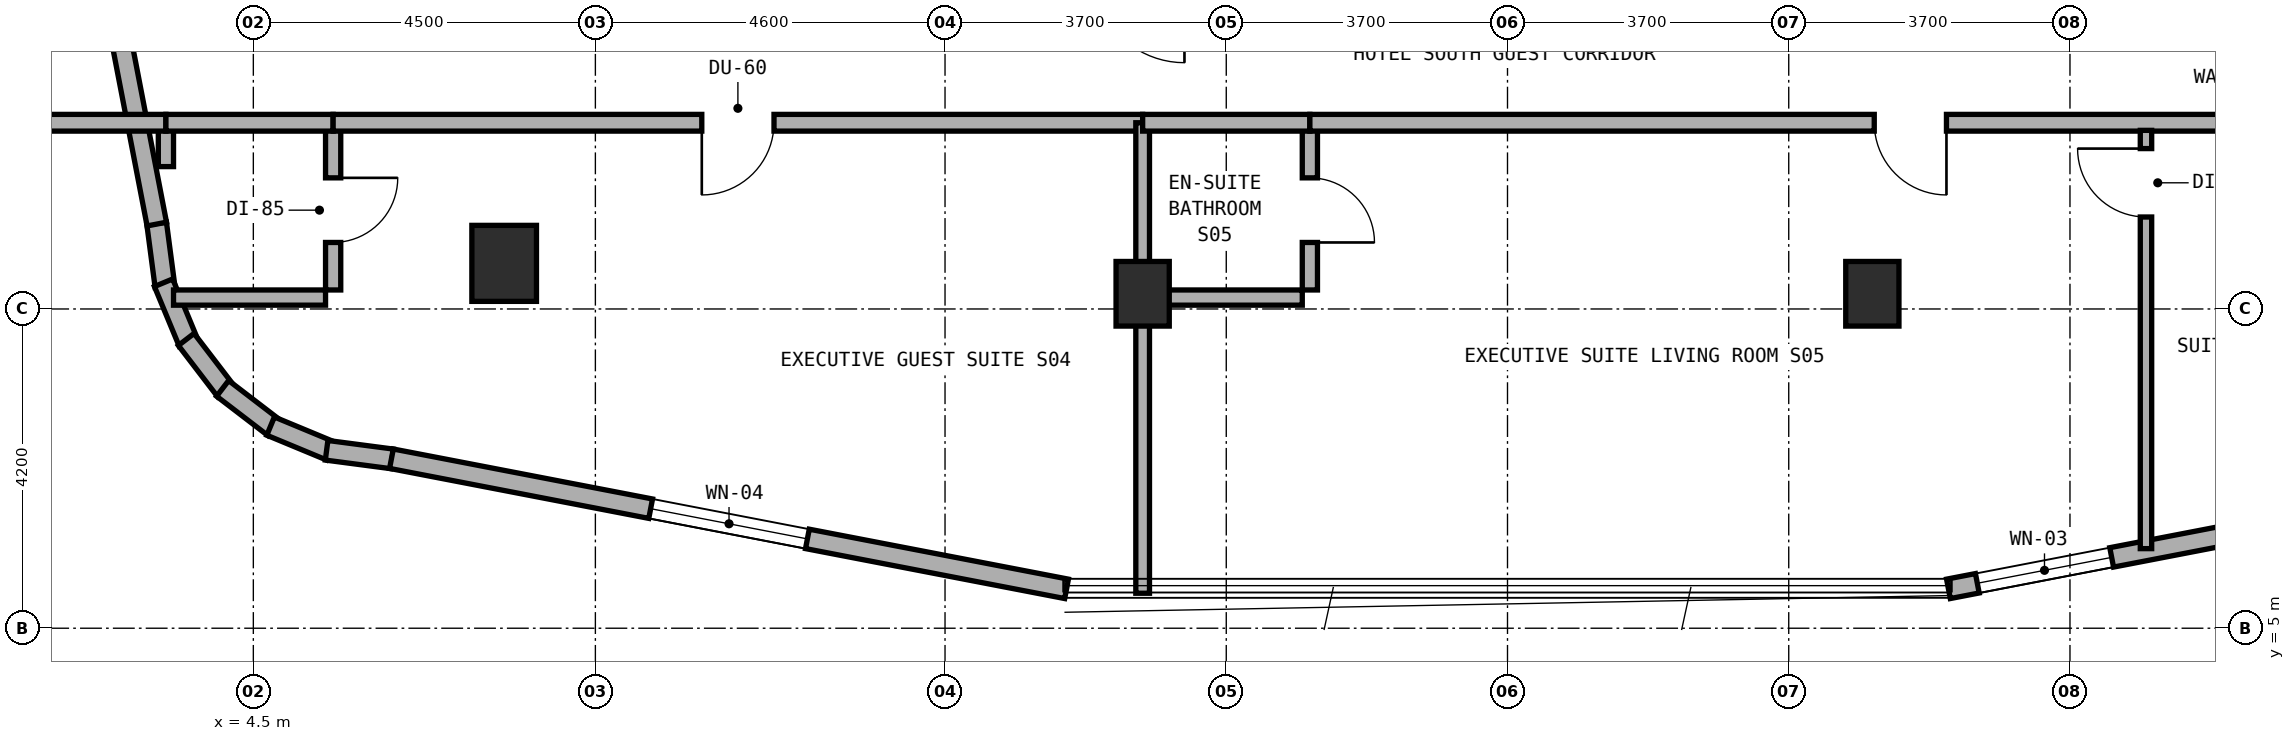
"""IFC4 building model, lengths in metres.
Left out: names, types, materials, properties, quantities, classifications, styles, units other than length and angle.
Written with IfcOpenShell. Run it as: python <this file> out.ifc"""

import sys

from ifc_helpers import new_model, si_unit, direction, frame, frame_2d, origin, origin_2d, place, context, subcontext, project, spatial, rectangle, extrude, element, fill, save


model = new_model("IFC4")
c1 = context("Model", 3, precision=1e-05, world=origin(), true_north=direction((0.0, 1.0)))
c2 = subcontext(c1, "Body", "Model", "MODEL_VIEW")
j1 = project(units=[si_unit("LENGTHUNIT", "METRE"), si_unit("PLANEANGLEUNIT", "RADIAN")], contexts=[c1])
p1 = place(None, origin())
s1 = spatial("IfcSite", under=j1, at=p1, CompositionType="ELEMENT")
p2 = place(p1, origin())
s2 = spatial("IfcBuilding", under=s1, at=p2, CompositionType="ELEMENT")
p3 = place(p2, frame((0.0, 0.0, 195.5)))
s3 = spatial("IfcBuildingStorey", under=s2, at=p3, CompositionType="ELEMENT", Elevation=195.5)
for number, where, z_axis, x_axis in (
    (1, (16.2, 9.4, 0.0), (0.0, 0.0, 1.0), (1.0, 0.0, 0.0)),
    (2, (25.8, 9.4, 0.0), (0.0, 0.0, 1.0), (1.0, 0.0, 0.0)),
):
    element("IfcColumn", number, at=place(p3, frame(where, z_axis=z_axis, x_axis=x_axis)), inside=s3, PredefinedType="COLUMN", context=c2, shape_type="SweptSolid", body=[
        extrude(rectangle(XDim=0.7, YDim=0.85, at=origin_2d()), origin(), (0.0, 0.0, 1.0), 3.6),
    ])
p4 = place(p3, frame((7.8, 9.8, 0.0), z_axis=(0.0, 0.0, 1.0), x_axis=(1.0, 0.0, 0.0)))
e3 = element("IfcColumn", 3, at=p4, inside=s3, PredefinedType="COLUMN", context=c2, shape_type="SweptSolid", body=[
    extrude(rectangle(XDim=0.85, YDim=1.0, at=origin_2d()), origin(), (0.0, 0.0, 1.0), 3.6),
])
p5 = place(p3, frame((3.228, 10.325, 0.0), z_axis=(0.0, 0.0, 1.0), x_axis=(0.130704676564, -0.99142134712, 0.0)))
e4 = element("IfcWall", 4, at=p5, inside=s3, PredefinedType="STANDARD", context=c2, shape_type="SweptSolid", body=[
    extrude(rectangle(XDim=0.833, YDim=0.26, at=frame_2d((0.417, 0.0))), origin(), (0.0, 0.0, 1.0), 3.28),
])
p6 = place(p3, frame((3.319, 9.545, 0.0), z_axis=(0.0, 0.0, 1.0), x_axis=(0.383086687796, -0.923712395518, 0.0)))
e5 = element("IfcWall", 5, at=p6, inside=s3, PredefinedType="STANDARD", context=c2, shape_type="SweptSolid", body=[
    extrude(rectangle(XDim=0.851, YDim=0.26, at=frame_2d((0.425, 0.0))), origin(), (0.0, 0.0, 1.0), 3.28),
])
for number, where, z_axis, x_axis in (
    (6, (3.617, 8.799, 0.0), (0.0, 0.0, 1.0), (0.608, -0.794, 0.0)),
    (7, (4.096, 8.155, 0.0), (0.0, 0.0, 1.0), (0.794, -0.608, 0.0)),
):
    element("IfcWall", number, at=place(p3, frame(where, z_axis=z_axis, x_axis=x_axis)), inside=s3, PredefinedType="STANDARD", context=c2, shape_type="SweptSolid", body=[
        extrude(rectangle(XDim=0.85, YDim=0.26, at=frame_2d((0.425, 0.0))), origin(), (0.0, 0.0, 1.0), 3.28),
    ])
p7 = place(p3, frame((4.727, 7.659, 0.0), z_axis=(0.0, 0.0, 1.0), x_axis=(0.923712395518, -0.383086687796, 0.0)))
e8 = element("IfcWall", 8, at=p7, inside=s3, PredefinedType="STANDARD", context=c2, shape_type="SweptSolid", body=[
    extrude(rectangle(XDim=0.851, YDim=0.26, at=frame_2d((0.425, 0.0))), origin(), (0.0, 0.0, 1.0), 3.28),
])
p8 = place(p3, frame((5.464, 7.341, 0.0), z_axis=(0.0, 0.0, 1.0), x_axis=(0.991488716273, -0.130192647656, 0.0)))
e9 = element("IfcWall", 9, at=p8, inside=s3, PredefinedType="STANDARD", context=c2, shape_type="SweptSolid", body=[
    extrude(rectangle(XDim=0.868, YDim=0.26, at=frame_2d((0.434, 0.0))), origin(), (0.0, 0.0, 1.0), 3.28),
])
p9 = place(p3, frame((6.317, 7.23, 0.0), z_axis=(0.0, 0.0, 1.0), x_axis=(0.98192801022, -0.189254809039, 0.0)))
e10 = element("IfcWall", 10, at=p9, inside=s3, PredefinedType="STANDARD", context=c2, shape_type="SweptSolid", body=[
    extrude(rectangle(XDim=9.046, YDim=0.26, at=frame_2d((4.523, 0.0))), origin(), (0.0, 0.0, 1.0), 3.28),
])
p10 = place(p9, frame((3.473, 0.0, 0.85)))
e11 = element("IfcOpeningElement", 11, at=p10, cuts=e10, PredefinedType="OPENING", context=c2, shape_type="SweptSolid", body=[
    extrude(rectangle(XDim=2.1, YDim=1.5, at=frame_2d((1.05, 0.75))), frame((0.0, 0.14, 0.0), z_axis=(0.0, -1.0, 0.0), x_axis=(1.0, 0.0, 0.0)), (0.0, 0.0, 1.0), 0.28),
])
p11 = place(p3, frame((26.801, 5.518, 0.0), z_axis=(0.0, 0.0, 1.0), x_axis=(0.98192801022, 0.189254809039, 0.0)))
e12 = element("IfcWall", 12, at=p11, inside=s3, PredefinedType="STANDARD", context=c2, shape_type="SweptSolid", body=[
    extrude(rectangle(XDim=9.046, YDim=0.26, at=frame_2d((4.523, 0.0))), origin(), (0.0, 0.0, 1.0), 3.28),
])
p12 = place(p11, frame((0.387, 0.0, 0.85)))
e13 = element("IfcOpeningElement", 13, at=p12, cuts=e12, PredefinedType="OPENING", context=c2, shape_type="SweptSolid", body=[
    extrude(rectangle(XDim=1.8, YDim=1.5, at=frame_2d((0.9, 0.75))), frame((0.0, 0.14, 0.0), z_axis=(0.0, -1.0, 0.0), x_axis=(1.0, 0.0, 0.0)), (0.0, 0.0, 1.0), 0.28),
])
p13 = place(p11, frame((4.065, 0.0, 0.85)))
e14 = element("IfcOpeningElement", 14, at=p13, cuts=e12, PredefinedType="OPENING", context=c2, shape_type="SweptSolid", body=[
    extrude(rectangle(XDim=2.1, YDim=1.5, at=frame_2d((1.05, 0.75))), frame((0.0, 0.14, 0.0), z_axis=(0.0, -1.0, 0.0), x_axis=(1.0, 0.0, 0.0)), (0.0, 0.0, 1.0), 0.28),
])
p14 = place(p3, frame((1.518, 19.199, 0.0), z_axis=(0.0, 0.0, 1.0), x_axis=(0.189254809039, -0.98192801022, 0.0)))
e15 = element("IfcWall", 15, at=p14, inside=s3, PredefinedType="STANDARD", context=c2, shape_type="SweptSolid", body=[
    extrude(rectangle(XDim=9.046, YDim=0.26, at=frame_2d((4.523, 0.0))), origin(), (0.0, 0.0, 1.0), 3.28),
])
p15 = place(p14, frame((2.733, 0.0, 0.85)))
e16 = element("IfcOpeningElement", 16, at=p15, cuts=e15, PredefinedType="OPENING", context=c2, shape_type="SweptSolid", body=[
    extrude(rectangle(XDim=2.1, YDim=1.5, at=frame_2d((1.05, 0.75))), frame((0.0, 0.14, 0.0), z_axis=(0.0, -1.0, 0.0), x_axis=(1.0, 0.0, 0.0)), (0.0, 0.0, 1.0), 0.28),
])
p16 = place(p3, frame((5.55, 9.45, 0.0), z_axis=(0.0, 0.0, 1.0), x_axis=(0.0, 1.0, 0.0)))
e17 = element("IfcWall", 17, at=p16, inside=s3, PredefinedType="PLUMBINGWALL", context=c2, shape_type="SweptSolid", body=[
    extrude(rectangle(XDim=2.1, YDim=0.2, at=frame_2d((1.05, 0.0))), origin(), (0.0, 0.0, 1.0), 3.28),
])
p17 = place(p16, frame((0.625, 0.0, 0.0)))
e18 = element("IfcOpeningElement", 18, at=p17, cuts=e17, PredefinedType="OPENING", context=c2, shape_type="SweptSolid", body=[
    extrude(rectangle(XDim=0.85, YDim=2.1, at=frame_2d((0.425, 1.05))), frame((0.0, 0.11, 0.0), z_axis=(0.0, -1.0, 0.0), x_axis=(1.0, 0.0, 0.0)), (0.0, 0.0, 1.0), 0.22),
])
p18 = place(p3, frame((3.45, 9.35, 0.0), z_axis=(0.0, 0.0, 1.0), x_axis=(1.0, 0.0, 0.0)))
e19 = element("IfcWall", 19, at=p18, inside=s3, PredefinedType="PLUMBINGWALL", context=c2, shape_type="SweptSolid", body=[
    extrude(rectangle(XDim=2.0, YDim=0.2, at=frame_2d((1.0, 0.0))), origin(), (0.0, 0.0, 1.0), 3.28),
])
p19 = place(p3, frame((3.35, 11.073, 0.0), z_axis=(0.0, 0.0, 1.0), x_axis=(0.0, 1.0, 0.0)))
e20 = element("IfcWall", 20, at=p19, inside=s3, PredefinedType="PLUMBINGWALL", context=c2, shape_type="SweptSolid", body=[
    extrude(rectangle(XDim=0.577, YDim=0.2, at=frame_2d((0.289, 0.0))), origin(), (0.0, 0.0, 1.0), 3.28),
])
p20 = place(p3, frame((1.56, 11.65, 0.0), z_axis=(0.0, 0.0, 1.0), x_axis=(1.0, 0.0, 0.0)))
e21 = element("IfcWall", 21, at=p20, inside=s3, PredefinedType="SOLIDWALL", context=c2, shape_type="SweptSolid", body=[
    extrude(rectangle(XDim=1.79, YDim=0.22, at=frame_2d((0.895, 0.0))), origin(), (0.0, 0.0, 1.0), 3.28),
])
p21 = place(p3, frame((3.35, 11.65, 0.0), z_axis=(0.0, 0.0, 1.0), x_axis=(1.0, 0.0, 0.0)))
e22 = element("IfcWall", 22, at=p21, inside=s3, PredefinedType="SOLIDWALL", context=c2, shape_type="SweptSolid", body=[
    extrude(rectangle(XDim=2.2, YDim=0.22, at=frame_2d((1.1, 0.0))), origin(), (0.0, 0.0, 1.0), 3.28),
])
p22 = place(p3, frame((5.55, 11.65, 0.0), z_axis=(0.0, 0.0, 1.0), x_axis=(1.0, 0.0, 0.0)))
e23 = element("IfcWall", 23, at=p22, inside=s3, PredefinedType="SOLIDWALL", context=c2, shape_type="SweptSolid", body=[
    extrude(rectangle(XDim=10.65, YDim=0.22, at=frame_2d((5.325, 0.0))), origin(), (0.0, 0.0, 1.0), 2.955),
])
p23 = place(p22, frame((4.85, 0.0, 0.0)))
e24 = element("IfcOpeningElement", 24, at=p23, cuts=e23, PredefinedType="OPENING", context=c2, shape_type="SweptSolid", body=[
    extrude(rectangle(XDim=0.95, YDim=2.1, at=frame_2d((0.475, 1.05))), frame((0.0, 0.12, 0.0), z_axis=(0.0, -1.0, 0.0), x_axis=(1.0, 0.0, 0.0)), (0.0, 0.0, 1.0), 0.24),
])
p24 = place(p3, frame((16.2, 5.46, 0.0), z_axis=(0.0, 0.0, 1.0), x_axis=(0.0, 1.0, 0.0)))
e25 = element("IfcWall", 25, at=p24, inside=s3, PredefinedType="SOLIDWALL", context=c2, shape_type="SweptSolid", body=[
    extrude(rectangle(XDim=6.19, YDim=0.18, at=frame_2d((3.095, 0.0))), origin(), (0.0, 0.0, 1.0), 2.895),
])
p25 = place(p3, frame((18.4, 9.45, 0.0), z_axis=(0.0, 0.0, 1.0), x_axis=(0.0, 1.0, 0.0)))
e26 = element("IfcWall", 26, at=p25, inside=s3, PredefinedType="PLUMBINGWALL", context=c2, shape_type="SweptSolid", body=[
    extrude(rectangle(XDim=2.1, YDim=0.2, at=frame_2d((1.05, 0.0))), origin(), (0.0, 0.0, 1.0), 2.895),
])
p26 = place(p25, frame((0.625, 0.0, 0.0)))
e27 = element("IfcOpeningElement", 27, at=p26, cuts=e26, PredefinedType="OPENING", context=c2, shape_type="SweptSolid", body=[
    extrude(rectangle(XDim=0.85, YDim=2.1, at=frame_2d((0.425, 1.05))), frame((0.0, 0.11, 0.0), z_axis=(0.0, -1.0, 0.0), x_axis=(1.0, 0.0, 0.0)), (0.0, 0.0, 1.0), 0.22),
])
p27 = place(p3, frame((16.3, 9.35, 0.0), z_axis=(0.0, 0.0, 1.0), x_axis=(1.0, 0.0, 0.0)))
e28 = element("IfcWall", 28, at=p27, inside=s3, PredefinedType="PLUMBINGWALL", context=c2, shape_type="SweptSolid", body=[
    extrude(rectangle(XDim=2.0, YDim=0.2, at=frame_2d((1.0, 0.0))), origin(), (0.0, 0.0, 1.0), 2.895),
])
p28 = place(p3, frame((16.2, 11.65, 0.0), z_axis=(0.0, 0.0, 1.0), x_axis=(1.0, 0.0, 0.0)))
e29 = element("IfcWall", 29, at=p28, inside=s3, PredefinedType="SOLIDWALL", context=c2, shape_type="SweptSolid", body=[
    extrude(rectangle(XDim=2.2, YDim=0.22, at=frame_2d((1.1, 0.0))), origin(), (0.0, 0.0, 1.0), 2.955),
])
p29 = place(p3, frame((18.4, 11.65, 0.0), z_axis=(0.0, 0.0, 1.0), x_axis=(1.0, 0.0, 0.0)))
e30 = element("IfcWall", 30, at=p29, inside=s3, PredefinedType="SOLIDWALL", context=c2, shape_type="SweptSolid", body=[
    extrude(rectangle(XDim=15.8, YDim=0.22, at=frame_2d((7.9, 0.0))), origin(), (0.0, 0.0, 1.0), 2.955),
])
p30 = place(p29, frame((7.425, 0.0, 0.0)))
e31 = element("IfcOpeningElement", 31, at=p30, cuts=e30, PredefinedType="OPENING", context=c2, shape_type="SweptSolid", body=[
    extrude(rectangle(XDim=0.95, YDim=2.1, at=frame_2d((0.475, 1.05))), frame((0.0, 0.12, 0.0), z_axis=(0.0, -1.0, 0.0), x_axis=(1.0, 0.0, 0.0)), (0.0, 0.0, 1.0), 0.24),
])
p31 = place(p3, frame((29.4, 6.047, 0.0), z_axis=(0.0, 0.0, 1.0), x_axis=(0.0, 1.0, 0.0)))
e32 = element("IfcWall", 32, at=p31, inside=s3, PredefinedType="PARTITIONING", context=c2, shape_type="SweptSolid", body=[
    extrude(rectangle(XDim=5.503, YDim=0.15, at=frame_2d((2.751, 0.0))), origin(), (0.0, 0.0, 1.0), 2.895),
])
p32 = place(p31, frame((4.363, 0.0, 0.0)))
e33 = element("IfcOpeningElement", 33, at=p32, cuts=e32, PredefinedType="OPENING", context=c2, shape_type="SweptSolid", body=[
    extrude(rectangle(XDim=0.9, YDim=2.1, at=frame_2d((0.45, 1.05))), frame((0.0, 0.085, 0.0), z_axis=(0.0, -1.0, 0.0), x_axis=(1.0, 0.0, 0.0)), (0.0, 0.0, 1.0), 0.17),
])
p33 = place(p10, origin())
e34 = element("IfcWindow", 34, at=p33, inside=s3, PartitioningType="SINGLE_PANEL", PredefinedType="WINDOW", context=c2, shape_type="SweptSolid", body=[
    extrude(rectangle(XDim=2.1, YDim=1.5, at=frame_2d((1.05, 0.75))), frame((0.0, 0.03, 0.0), z_axis=(0.0, -1.0, 0.0), x_axis=(1.0, 0.0, 0.0)), (0.0, 0.0, 1.0), 0.06),
])
fill(e11, e34)
p34 = place(p12, origin())
e35 = element("IfcWindow", 35, at=p34, inside=s3, PartitioningType="SINGLE_PANEL", PredefinedType="WINDOW", context=c2, shape_type="SweptSolid", body=[
    extrude(rectangle(XDim=1.8, YDim=1.5, at=frame_2d((0.9, 0.75))), frame((0.0, 0.03, 0.0), z_axis=(0.0, -1.0, 0.0), x_axis=(1.0, 0.0, 0.0)), (0.0, 0.0, 1.0), 0.06),
])
fill(e13, e35)
p35 = place(p17, frame((0.85, 0.0, 0.0), z_axis=(0.0, 0.0, 1.0), x_axis=(-1.0, 0.0, 0.0)))
e36 = element("IfcDoor", 36, at=p35, inside=s3, OperationType="SINGLE_SWING_LEFT", PredefinedType="DOOR", context=c2, shape_type="SweptSolid", body=[
    extrude(rectangle(XDim=0.85, YDim=2.1, at=frame_2d((0.425, 1.05))), frame((0.0, 0.025, 0.0), z_axis=(0.0, -1.0, 0.0), x_axis=(1.0, 0.0, 0.0)), (0.0, 0.0, 1.0), 0.05),
])
fill(e18, e36)
p36 = place(p23, frame((0.95, 0.0, 0.0), z_axis=(0.0, 0.0, 1.0), x_axis=(-1.0, 0.0, 0.0)))
e37 = element("IfcDoor", 37, at=p36, inside=s3, OperationType="SINGLE_SWING_RIGHT", PredefinedType="DOOR", context=c2, shape_type="SweptSolid", body=[
    extrude(rectangle(XDim=0.95, YDim=2.1, at=frame_2d((0.475, 1.05))), frame((0.0, 0.025, 0.0), z_axis=(0.0, -1.0, 0.0), x_axis=(1.0, 0.0, 0.0)), (0.0, 0.0, 1.0), 0.05),
])
fill(e24, e37)
p37 = place(p26, frame((0.85, 0.0, 0.0), z_axis=(0.0, 0.0, 1.0), x_axis=(-1.0, 0.0, 0.0)))
e38 = element("IfcDoor", 38, at=p37, inside=s3, OperationType="SINGLE_SWING_RIGHT", PredefinedType="DOOR", context=c2, shape_type="SweptSolid", body=[
    extrude(rectangle(XDim=0.85, YDim=2.1, at=frame_2d((0.425, 1.05))), frame((0.0, 0.025, 0.0), z_axis=(0.0, -1.0, 0.0), x_axis=(1.0, 0.0, 0.0)), (0.0, 0.0, 1.0), 0.05),
])
fill(e27, e38)
p38 = place(p30, frame((0.95, 0.0, 0.0), z_axis=(0.0, 0.0, 1.0), x_axis=(-1.0, 0.0, 0.0)))
e39 = element("IfcDoor", 39, at=p38, inside=s3, OperationType="SINGLE_SWING_LEFT", PredefinedType="DOOR", context=c2, shape_type="SweptSolid", body=[
    extrude(rectangle(XDim=0.95, YDim=2.1, at=frame_2d((0.475, 1.05))), frame((0.0, 0.025, 0.0), z_axis=(0.0, -1.0, 0.0), x_axis=(1.0, 0.0, 0.0)), (0.0, 0.0, 1.0), 0.05),
])
fill(e31, e39)
p39 = place(p32, origin())
e40 = element("IfcDoor", 40, at=p39, inside=s3, OperationType="SINGLE_SWING_RIGHT", PredefinedType="DOOR", context=c2, shape_type="SweptSolid", body=[
    extrude(rectangle(XDim=0.9, YDim=2.1, at=frame_2d((0.45, 1.05))), frame((0.0, 0.025, 0.0), z_axis=(0.0, -1.0, 0.0), x_axis=(1.0, 0.0, 0.0)), (0.0, 0.0, 1.0), 0.05),
])
fill(e33, e40)
save(model, sys.argv[1])
